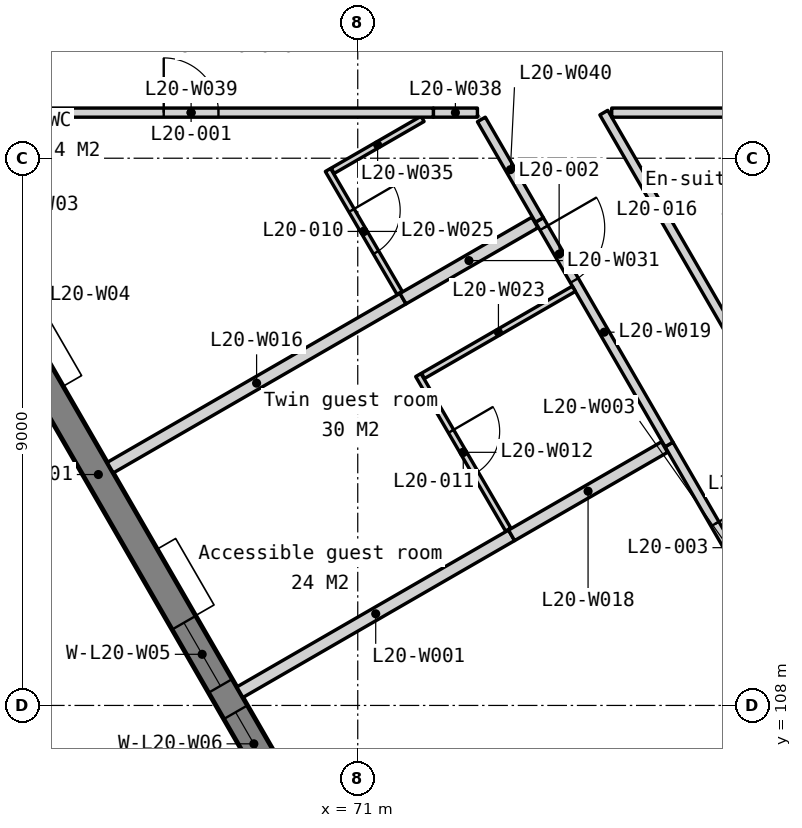
"""IFC4 building model, lengths in metres.
Left out: names, types, materials, properties, quantities, classifications, styles, units other than length and angle.
Written with IfcOpenShell. Run it as: python <this file> out.ifc"""

import sys

from ifc_helpers import new_model, si_unit, direction, frame, frame_2d, origin, place, context, subcontext, project, spatial, polyline, rectangle, outline, extrude, element, fill, save


model = new_model("IFC4")
c1 = context("Model", 3, precision=1e-05, world=origin(), true_north=direction((0.0, 1.0)))
c2 = subcontext(c1, "Body", "Model", "MODEL_VIEW")
j1 = project(units=[si_unit("LENGTHUNIT", "METRE"), si_unit("PLANEANGLEUNIT", "RADIAN")], contexts=[c1])
p1 = place(None, origin())
s1 = spatial("IfcSite", under=j1, at=p1, CompositionType="ELEMENT")
p2 = place(p1, origin())
s2 = spatial("IfcBuilding", under=s1, at=p2, CompositionType="ELEMENT")
p3 = place(p2, frame((0.0, 0.0, 85.3)))
s3 = spatial("IfcBuildingStorey", under=s2, at=p3, CompositionType="ELEMENT", Elevation=85.3)
p4 = place(p3, frame((56.073, 130.263, -0.15), z_axis=(0.0, 0.0, 1.0), x_axis=(0.500000478905, -0.866025127289, 0.0)))
e1 = element("IfcWall", 1, at=p4, inside=s3, PredefinedType="SOLIDWALL", context=c2, shape_type="SweptSolid", body=[
    extrude(outline(polyline([(42.643, 0.0), (42.643, 3.5), (0.0, 3.5), (0.0, 0.0), (42.643, 0.0)])), frame((0.0, 0.225, 0.0), z_axis=(0.0, -1.0, 0.0), x_axis=(1.0, 0.0, 0.0)), (0.0, 0.0, 1.0), 0.45),
])
p5 = place(p4, frame((7.079, 0.0, 1.05)))
e2 = element("IfcOpeningElement", 2, at=p5, cuts=e1, PredefinedType="OPENING", context=c2, shape_type="SweptSolid", body=[
    extrude(rectangle(XDim=1.2, YDim=1.5, at=frame_2d((0.6, 0.75))), frame((0.0, 0.235, 0.0), z_axis=(0.0, -1.0, 0.0), x_axis=(1.0, 0.0, 0.0)), (0.0, 0.0, 1.0), 0.47),
])
p6 = place(p4, frame((8.779, 0.0, 1.05)))
e3 = element("IfcOpeningElement", 3, at=p6, cuts=e1, PredefinedType="OPENING", context=c2, shape_type="SweptSolid", body=[
    extrude(rectangle(XDim=1.2, YDim=1.5, at=frame_2d((0.6, 0.75))), frame((0.0, 0.235, 0.0), z_axis=(0.0, -1.0, 0.0), x_axis=(1.0, 0.0, 0.0)), (0.0, 0.0, 1.0), 0.47),
])
p7 = place(p4, frame((15.607, 0.0, 1.05)))
e4 = element("IfcOpeningElement", 4, at=p7, cuts=e1, PredefinedType="OPENING", context=c2, shape_type="SweptSolid", body=[
    extrude(rectangle(XDim=1.2, YDim=1.5, at=frame_2d((0.6, 0.75))), frame((0.0, 0.235, 0.0), z_axis=(0.0, -1.0, 0.0), x_axis=(1.0, 0.0, 0.0)), (0.0, 0.0, 1.0), 0.47),
])
p8 = place(p4, frame((17.307, 0.0, 1.05)))
e5 = element("IfcOpeningElement", 5, at=p8, cuts=e1, PredefinedType="OPENING", context=c2, shape_type="SweptSolid", body=[
    extrude(rectangle(XDim=1.2, YDim=1.5, at=frame_2d((0.6, 0.75))), frame((0.0, 0.235, 0.0), z_axis=(0.0, -1.0, 0.0), x_axis=(1.0, 0.0, 0.0)), (0.0, 0.0, 1.0), 0.47),
])
p9 = place(p4, frame((24.136, 0.0, 1.05)))
e6 = element("IfcOpeningElement", 6, at=p9, cuts=e1, PredefinedType="OPENING", context=c2, shape_type="SweptSolid", body=[
    extrude(rectangle(XDim=1.2, YDim=1.5, at=frame_2d((0.6, 0.75))), frame((0.0, 0.235, 0.0), z_axis=(0.0, -1.0, 0.0), x_axis=(1.0, 0.0, 0.0)), (0.0, 0.0, 1.0), 0.47),
])
p10 = place(p4, frame((25.836, 0.0, 1.05)))
e7 = element("IfcOpeningElement", 7, at=p10, cuts=e1, PredefinedType="OPENING", context=c2, shape_type="SweptSolid", body=[
    extrude(rectangle(XDim=1.2, YDim=1.5, at=frame_2d((0.6, 0.75))), frame((0.0, 0.235, 0.0), z_axis=(0.0, -1.0, 0.0), x_axis=(1.0, 0.0, 0.0)), (0.0, 0.0, 1.0), 0.47),
])
p11 = place(p4, frame((32.665, 0.0, 1.05)))
e8 = element("IfcOpeningElement", 8, at=p11, cuts=e1, PredefinedType="OPENING", context=c2, shape_type="SweptSolid", body=[
    extrude(rectangle(XDim=1.2, YDim=1.5, at=frame_2d((0.6, 0.75))), frame((0.0, 0.235, 0.0), z_axis=(0.0, -1.0, 0.0), x_axis=(1.0, 0.0, 0.0)), (0.0, 0.0, 1.0), 0.47),
])
p12 = place(p4, frame((34.365, 0.0, 1.05)))
e9 = element("IfcOpeningElement", 9, at=p12, cuts=e1, PredefinedType="OPENING", context=c2, shape_type="SweptSolid", body=[
    extrude(rectangle(XDim=1.2, YDim=1.5, at=frame_2d((0.6, 0.75))), frame((0.0, 0.235, 0.0), z_axis=(0.0, -1.0, 0.0), x_axis=(1.0, 0.0, 0.0)), (0.0, 0.0, 1.0), 0.47),
])
p13 = place(p3, frame((69.061, 108.217, 0.0), z_axis=(0.0, 0.0, 1.0), x_axis=(0.866021702275, 0.500006411147, 0.0)))
e10 = element("IfcWall", 10, at=p13, inside=s3, PredefinedType="PARTITIONING", context=c2, shape_type="SweptSolid", body=[
    extrude(rectangle(XDim=5.16, YDim=0.2, at=frame_2d((2.58, 0.0))), origin(), (0.0, 0.0, 1.0), 3.35),
])
p14 = place(p3, frame((76.119, 112.292, 0.0), z_axis=(0.0, 0.0, 1.0), x_axis=(0.50006385284, -0.865988535192, 0.0)))
e11 = element("IfcWall", 11, at=p14, inside=s3, PredefinedType="PARTITIONING", context=c2, shape_type="SweptSolid", body=[
    extrude(rectangle(XDim=3.92, YDim=0.15, at=frame_2d((1.96, 0.0))), origin(), (0.0, 0.0, 1.0), 3.35),
])
p15 = place(p14, frame((1.51, 0.0, 0.0)))
e12 = element("IfcOpeningElement", 12, at=p15, cuts=e11, PredefinedType="OPENING", context=c2, shape_type="SweptSolid", body=[
    extrude(rectangle(XDim=0.9, YDim=2.1, at=frame_2d((0.45, 1.05))), frame((0.0, 0.085, 0.0), z_axis=(0.0, -1.0, 0.0), x_axis=(1.0, 0.0, 0.0)), (0.0, 0.0, 1.0), 0.17),
])
p16 = place(p3, frame((71.996, 113.434, 0.0), z_axis=(0.0, 0.0, 1.0), x_axis=(0.50282251156, -0.864389681723, 0.0)))
e13 = element("IfcWall", 13, at=p16, inside=s3, PredefinedType="PARTITIONING", context=c2, shape_type="SweptSolid", body=[
    extrude(rectangle(XDim=2.94, YDim=0.1, at=frame_2d((1.47, 0.0))), origin(), (0.0, 0.0, 1.0), 3.35),
])
p17 = place(p16, frame((1.07, 0.0, 0.0)))
e14 = element("IfcOpeningElement", 14, at=p17, cuts=e13, PredefinedType="OPENING", context=c2, shape_type="SweptSolid", body=[
    extrude(rectangle(XDim=0.8, YDim=2.1, at=frame_2d((0.4, 1.05))), frame((0.0, 0.06, 0.0), z_axis=(0.0, -1.0, 0.0), x_axis=(1.0, 0.0, 0.0)), (0.0, 0.0, 1.0), 0.12),
])
p18 = place(p3, frame((66.929, 111.91, 0.0), z_axis=(0.0, 0.0, 1.0), x_axis=(0.866026912667, 0.49999738653, 0.0)))
e15 = element("IfcWall", 15, at=p18, inside=s3, PredefinedType="PARTITIONING", context=c2, shape_type="SweptSolid", body=[
    extrude(rectangle(XDim=5.56, YDim=0.2, at=frame_2d((2.78, 0.0))), origin(), (0.0, 0.0, 1.0), 3.35),
])
p19 = place(p3, frame((73.53, 110.797, 0.0), z_axis=(0.0, 0.0, 1.0), x_axis=(0.866047038303, 0.499962526042, 0.0)))
e16 = element("IfcWall", 16, at=p19, inside=s3, PredefinedType="PARTITIONING", context=c2, shape_type="SweptSolid", body=[
    extrude(rectangle(XDim=2.905, YDim=0.2, at=frame_2d((1.453, 0.0))), origin(), (0.0, 0.0, 1.0), 3.35),
])
p20 = place(p3, frame((73.987, 115.985, 0.0), z_axis=(0.0, 0.0, 1.0), x_axis=(0.4999752019, -0.866039720501, 0.0)))
e17 = element("IfcWall", 17, at=p20, inside=s3, PredefinedType="PARTITIONING", context=c2, shape_type="SweptSolid", body=[
    extrude(rectangle(XDim=4.264, YDim=0.15, at=frame_2d((2.132, 0.0))), origin(), (0.0, 0.0, 1.0), 3.35),
])
p21 = place(p20, frame((0.15, 0.0, 0.0)))
e18 = element("IfcOpeningElement", 18, at=p21, cuts=e17, PredefinedType="OPENING", context=c2, shape_type="SweptSolid", body=[
    extrude(rectangle(XDim=1.0, YDim=2.1, at=frame_2d((0.5, 1.05))), frame((0.0, 0.085, 0.0), z_axis=(0.0, -1.0, 0.0), x_axis=(1.0, 0.0, 0.0)), (0.0, 0.0, 1.0), 0.17),
])
p22 = place(p3, frame((72.073, 113.42, 0.0), z_axis=(0.0, 0.0, 1.0), x_axis=(0.866047940603, 0.499960963054, 0.0)))
e19 = element("IfcWall", 19, at=p22, inside=s3, PredefinedType="PARTITIONING", context=c2, shape_type="SweptSolid", body=[
    extrude(rectangle(XDim=2.865, YDim=0.1, at=frame_2d((1.433, 0.0))), origin(), (0.0, 0.0, 1.0), 3.35),
])
p23 = place(p3, frame((70.51, 116.807, 0.0), z_axis=(0.0, 0.0, 1.0), x_axis=(0.503637463939, -0.863915102841, 0.0)))
e20 = element("IfcWall", 20, at=p23, inside=s3, PredefinedType="PARTITIONING", context=c2, shape_type="SweptSolid", body=[
    extrude(rectangle(XDim=2.34, YDim=0.1, at=frame_2d((1.17, 0.0))), origin(), (0.0, 0.0, 1.0), 3.35),
])
p24 = place(p23, frame((0.77, 0.0, 0.0)))
e21 = element("IfcOpeningElement", 21, at=p24, cuts=e20, PredefinedType="OPENING", context=c2, shape_type="SweptSolid", body=[
    extrude(rectangle(XDim=0.8, YDim=2.1, at=frame_2d((0.4, 1.05))), frame((0.0, 0.06, 0.0), z_axis=(0.0, -1.0, 0.0), x_axis=(1.0, 0.0, 0.0)), (0.0, 0.0, 1.0), 0.12),
])
p25 = place(p3, frame((71.744, 114.69, 0.0), z_axis=(0.0, 0.0, 1.0), x_axis=(0.865972946165, 0.500090848258, 0.0)))
e22 = element("IfcWall", 22, at=p25, inside=s3, PredefinedType="PARTITIONING", context=c2, shape_type="SweptSolid", body=[
    extrude(rectangle(XDim=2.505, YDim=0.2, at=frame_2d((1.252, 0.0))), origin(), (0.0, 0.0, 1.0), 3.35),
])
p26 = place(p3, frame((70.587, 116.794, 0.0), z_axis=(0.0, 0.0, 1.0), x_axis=(0.866026058841, 0.499998865407, 0.0)))
e23 = element("IfcWall", 23, at=p26, inside=s3, PredefinedType="PARTITIONING", context=c2, shape_type="SweptSolid", body=[
    extrude(rectangle(XDim=1.708, YDim=0.1, at=frame_2d((0.854, 0.0))), origin(), (0.0, 0.0, 1.0), 3.35),
])
p27 = place(p3, frame((72.244, 117.75, 0.0), z_axis=(0.0, 0.0, 1.0), x_axis=(1.0, 0.0, 0.0)))
e24 = element("IfcWall", 24, at=p27, inside=s3, PredefinedType="PARTITIONING", context=c2, shape_type="SweptSolid", body=[
    extrude(rectangle(XDim=0.725, YDim=0.15, at=frame_2d((0.362, 0.0))), origin(), (0.0, 0.0, 1.0), 3.35),
])
p28 = place(p3, frame((64.275, 117.75, 0.0), z_axis=(0.0, 0.0, 1.0), x_axis=(1.0, 0.0, 0.0)))
e25 = element("IfcWall", 25, at=p28, inside=s3, PredefinedType="PARTITIONING", context=c2, shape_type="SweptSolid", body=[
    extrude(rectangle(XDim=7.969, YDim=0.15, at=frame_2d((3.984, 0.0))), origin(), (0.0, 0.0, 1.0), 3.35),
])
p29 = place(p28, frame((3.534, 0.0, 0.0)))
e26 = element("IfcOpeningElement", 26, at=p29, cuts=e25, PredefinedType="OPENING", context=c2, shape_type="SweptSolid", body=[
    extrude(rectangle(XDim=0.9, YDim=2.1, at=frame_2d((0.45, 1.05))), frame((0.0, 0.085, 0.0), z_axis=(0.0, -1.0, 0.0), x_axis=(1.0, 0.0, 0.0)), (0.0, 0.0, 1.0), 0.17),
])
p30 = place(p3, frame((73.033, 117.637, 0.0), z_axis=(0.0, 0.0, 1.0), x_axis=(0.500006788699, -0.866021484292, 0.0)))
e27 = element("IfcWall", 27, at=p30, inside=s3, PredefinedType="PARTITIONING", context=c2, shape_type="SweptSolid", body=[
    extrude(rectangle(XDim=1.908, YDim=0.15, at=frame_2d((0.954, 0.0))), origin(), (0.0, 0.0, 1.0), 3.35),
])
p31 = place(p3, frame((75.047, 117.75, 0.0), z_axis=(0.0, 0.0, 1.0), x_axis=(0.499995505729, -0.866027998537, 0.0)))
e28 = element("IfcWall", 28, at=p31, inside=s3, PredefinedType="PARTITIONING", context=c2, shape_type="SweptSolid", body=[
    extrude(rectangle(XDim=9.907, YDim=0.15, at=frame_2d((4.953, 0.0))), origin(), (0.0, 0.0, 1.0), 3.35),
])
p32 = place(p31, frame((4.053, 0.0, 0.0)))
e29 = element("IfcOpeningElement", 29, at=p32, cuts=e28, PredefinedType="OPENING", context=c2, shape_type="SweptSolid", body=[
    extrude(rectangle(XDim=1.8, YDim=2.1, at=frame_2d((0.9, 1.05))), frame((0.0, 0.085, 0.0), z_axis=(0.0, -1.0, 0.0), x_axis=(1.0, 0.0, 0.0)), (0.0, 0.0, 1.0), 0.17),
])
p33 = place(p3, frame((75.177, 117.75, 0.0), z_axis=(0.0, 0.0, 1.0), x_axis=(1.0, 0.0, 0.0)))
e30 = element("IfcWall", 30, at=p33, inside=s3, PredefinedType="PARTITIONING", context=c2, shape_type="SweptSolid", body=[
    extrude(rectangle(XDim=9.647, YDim=0.15, at=frame_2d((4.823, 0.0))), origin(), (0.0, 0.0, 1.0), 3.35),
])
p34 = place(p9, origin())
e31 = element("IfcWindow", 31, at=p34, inside=s3, PartitioningType="SINGLE_PANEL", PredefinedType="WINDOW", context=c2, shape_type="SweptSolid", body=[
    extrude(rectangle(XDim=1.2, YDim=1.5, at=frame_2d((0.6, 0.75))), frame((0.0, 0.03, 0.0), z_axis=(0.0, -1.0, 0.0), x_axis=(1.0, 0.0, 0.0)), (0.0, 0.0, 1.0), 0.06),
])
fill(e6, e31)
p35 = place(p10, origin())
e32 = element("IfcWindow", 32, at=p35, inside=s3, PartitioningType="SINGLE_PANEL", PredefinedType="WINDOW", context=c2, shape_type="SweptSolid", body=[
    extrude(rectangle(XDim=1.2, YDim=1.5, at=frame_2d((0.6, 0.75))), frame((0.0, 0.03, 0.0), z_axis=(0.0, -1.0, 0.0), x_axis=(1.0, 0.0, 0.0)), (0.0, 0.0, 1.0), 0.06),
])
fill(e7, e32)
p36 = place(p29, origin())
e33 = element("IfcDoor", 33, at=p36, inside=s3, OperationType="SINGLE_SWING_LEFT", PredefinedType="DOOR", context=c2, shape_type="SweptSolid", body=[
    extrude(rectangle(XDim=0.9, YDim=2.1, at=frame_2d((0.45, 1.05))), frame((0.0, 0.025, 0.0), z_axis=(0.0, -1.0, 0.0), x_axis=(1.0, 0.0, 0.0)), (0.0, 0.0, 1.0), 0.05),
])
fill(e26, e33)
p37 = place(p21, origin())
e34 = element("IfcDoor", 34, at=p37, inside=s3, OperationType="SINGLE_SWING_LEFT", PredefinedType="DOOR", context=c2, shape_type="SweptSolid", body=[
    extrude(rectangle(XDim=1.0, YDim=2.1, at=frame_2d((0.5, 1.05))), frame((0.0, 0.025, 0.0), z_axis=(0.0, -1.0, 0.0), x_axis=(1.0, 0.0, 0.0)), (0.0, 0.0, 1.0), 0.05),
])
fill(e18, e34)
p38 = place(p15, origin())
e35 = element("IfcDoor", 35, at=p38, inside=s3, OperationType="SINGLE_SWING_LEFT", PredefinedType="DOOR", context=c2, shape_type="SweptSolid", body=[
    extrude(rectangle(XDim=0.9, YDim=2.1, at=frame_2d((0.45, 1.05))), frame((0.0, 0.025, 0.0), z_axis=(0.0, -1.0, 0.0), x_axis=(1.0, 0.0, 0.0)), (0.0, 0.0, 1.0), 0.05),
])
fill(e12, e35)
p39 = place(p24, origin())
e36 = element("IfcDoor", 36, at=p39, inside=s3, OperationType="SINGLE_SWING_LEFT", PredefinedType="DOOR", context=c2, shape_type="SweptSolid", body=[
    extrude(rectangle(XDim=0.8, YDim=2.1, at=frame_2d((0.4, 1.05))), frame((0.0, 0.025, 0.0), z_axis=(0.0, -1.0, 0.0), x_axis=(1.0, 0.0, 0.0)), (0.0, 0.0, 1.0), 0.05),
])
fill(e21, e36)
p40 = place(p17, origin())
e37 = element("IfcDoor", 37, at=p40, inside=s3, OperationType="SINGLE_SWING_LEFT", PredefinedType="DOOR", context=c2, shape_type="SweptSolid", body=[
    extrude(rectangle(XDim=0.8, YDim=2.1, at=frame_2d((0.4, 1.05))), frame((0.0, 0.025, 0.0), z_axis=(0.0, -1.0, 0.0), x_axis=(1.0, 0.0, 0.0)), (0.0, 0.0, 1.0), 0.05),
])
fill(e14, e37)
save(model, sys.argv[1])
